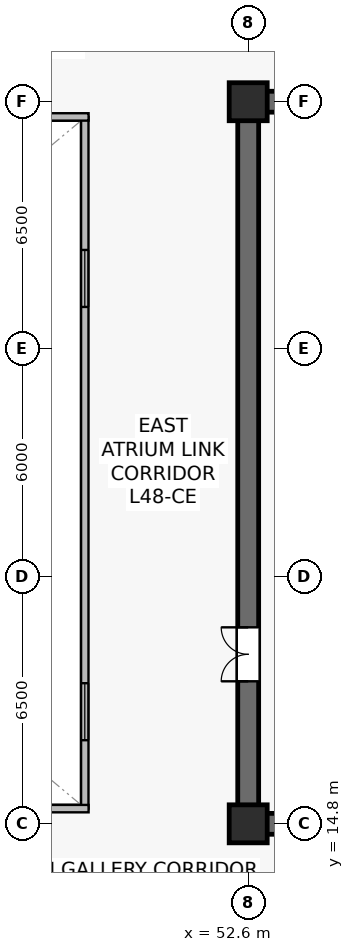
"""IFC4 building model, lengths in metres.
Left out: names, types, materials, properties, quantities, classifications, styles, units other than length and angle.
Written with IfcOpenShell. Run it as: python <this file> out.ifc"""

import sys

from ifc_helpers import new_model, si_unit, direction, frame, frame_2d, origin, origin_2d, place, context, subcontext, project, spatial, rectangle, extrude, source, transform, mapped, element, fill, save


model = new_model("IFC4")
c1 = context("Model", 3, precision=1e-05, world=origin(), true_north=direction((0.0, 1.0)))
c2 = subcontext(c1, "Body", "Model", "MODEL_VIEW")
j1 = project(units=[si_unit("LENGTHUNIT", "METRE"), si_unit("PLANEANGLEUNIT", "RADIAN")], contexts=[c1])
p1 = place(None, origin())
s1 = spatial("IfcSite", under=j1, at=p1, CompositionType="ELEMENT")
p2 = place(p1, origin())
s2 = spatial("IfcBuilding", under=s1, at=p2, CompositionType="ELEMENT")
p3 = place(p2, frame((0.0, 0.0, 201.4)))
s3 = spatial("IfcBuildingStorey", under=s2, at=p3, CompositionType="ELEMENT", Elevation=201.4)
p4 = place(p3, frame((52.325, 14.8, 0.0), z_axis=(0.0, 0.0, 1.0), x_axis=(1.0, 0.0, 0.0)))
e1 = element("IfcWall", 1, at=p4, inside=s3, PredefinedType="SHEAR", context=c2, shape_type="SweptSolid", body=[
    extrude(rectangle(XDim=15.35, YDim=0.55, at=frame_2d((7.675, 0.0))), origin(), (0.0, 0.0, 1.0), 3.8),
])
p5 = place(p3, frame((52.325, 33.8, 0.0), z_axis=(0.0, 0.0, 1.0), x_axis=(1.0, 0.0, 0.0)))
e2 = element("IfcWall", 2, at=p5, inside=s3, PredefinedType="SHEAR", context=c2, shape_type="SweptSolid", body=[
    extrude(rectangle(XDim=15.35, YDim=0.55, at=frame_2d((7.675, 0.0))), origin(), (0.0, 0.0, 1.0), 3.8),
])
p6 = place(p5, frame((7.625, 0.0, 0.0)))
e3 = element("IfcOpeningElement", 3, at=p6, cuts=e2, PredefinedType="OPENING", context=c2, shape_type="SweptSolid", body=[
    extrude(rectangle(XDim=0.95, YDim=2.15, at=frame_2d((0.475, 1.075))), frame((0.0, 0.285, 0.0), z_axis=(0.0, -1.0, 0.0), x_axis=(1.0, 0.0, 0.0)), (0.0, 0.0, 1.0), 0.57),
])
p7 = place(p5, frame((2.56, 0.0, 0.0)))
e4 = element("IfcOpeningElement", 4, at=p7, cuts=e2, PredefinedType="OPENING", context=c2, shape_type="SweptSolid", body=[
    extrude(rectangle(XDim=0.95, YDim=2.15, at=frame_2d((0.475, 1.075))), frame((0.0, 0.285, 0.0), z_axis=(0.0, -1.0, 0.0), x_axis=(1.0, 0.0, 0.0)), (0.0, 0.0, 1.0), 0.57),
])
p8 = place(p3, frame((52.6, 15.075, 0.0), z_axis=(0.0, 0.0, 1.0), x_axis=(0.0, 1.0, 0.0)))
e5 = element("IfcWall", 5, at=p8, inside=s3, PredefinedType="SHEAR", context=c2, shape_type="SweptSolid", body=[
    extrude(rectangle(XDim=18.45, YDim=0.55, at=frame_2d((9.225, 0.0))), origin(), (0.0, 0.0, 1.0), 3.8),
])
p9 = place(p8, frame((3.475, 0.0, 0.0)))
e6 = element("IfcOpeningElement", 6, at=p9, cuts=e5, PredefinedType="OPENING", context=c2, shape_type="SweptSolid", body=[
    extrude(rectangle(XDim=1.42, YDim=2.2, at=frame_2d((0.71, 1.1))), frame((0.0, 0.285, 0.0), z_axis=(0.0, -1.0, 0.0), x_axis=(1.0, 0.0, 0.0)), (0.0, 0.0, 1.0), 0.57),
])
m1 = source(origin(), c2, "Body", "SweptSolid", [
    extrude(rectangle(XDim=1.0, YDim=1.0, at=origin_2d()), origin(), (0.0, 0.0, 1.0), 4.1),
])
for number, where, z_axis, x_axis in (
    (7, (52.6, 14.8, 0.0), (0.0, 0.0, 1.0), (1.0, 0.0, 0.0)),
    (8, (52.6, 33.8, 0.0), (0.0, 0.0, 1.0), (1.0, 0.0, 0.0)),
):
    element("IfcColumn", number, at=place(p3, frame(where, z_axis=z_axis, x_axis=x_axis)), inside=s3, PredefinedType="COLUMN", context=c2, shape_type="MappedRepresentation", body=[
        mapped(m1, transform((0.0, 0.0, 0.0), scale=1.0)),
    ])
p10 = place(p3, frame((48.3, 15.2, 0.0), z_axis=(0.0, 0.0, 1.0), x_axis=(0.0, 1.0, 0.0)))
e9 = element("IfcWall", 9, at=p10, inside=s3, PredefinedType="SOLIDWALL", context=c2, shape_type="SweptSolid", body=[
    extrude(rectangle(XDim=18.2, YDim=0.195, at=frame_2d((9.1, 0.0))), origin(), (0.0, 0.0, 1.0), 3.8),
])
p11 = place(p10, frame((1.8, 0.0, 0.9)))
e10 = element("IfcOpeningElement", 10, at=p11, cuts=e9, PredefinedType="OPENING", context=c2, shape_type="SweptSolid", body=[
    extrude(rectangle(XDim=1.5, YDim=1.4, at=frame_2d((0.75, 0.7))), frame((0.0, 0.107, 0.0), z_axis=(0.0, -1.0, 0.0), x_axis=(1.0, 0.0, 0.0)), (0.0, 0.0, 1.0), 0.215),
])
p12 = place(p10, frame((13.2, 0.0, 0.9)))
e11 = element("IfcOpeningElement", 11, at=p12, cuts=e9, PredefinedType="OPENING", context=c2, shape_type="SweptSolid", body=[
    extrude(rectangle(XDim=1.5, YDim=1.4, at=frame_2d((0.75, 0.7))), frame((0.0, 0.107, 0.0), z_axis=(0.0, -1.0, 0.0), x_axis=(1.0, 0.0, 0.0)), (0.0, 0.0, 1.0), 0.215),
])
for number, where, z_axis, x_axis in (
    (12, (26.4, 15.2, 0.0), (0.0, 0.0, 1.0), (1.0, 0.0, 0.0)),
    (13, (26.4, 33.4, 0.0), (0.0, 0.0, 1.0), (1.0, 0.0, 0.0)),
):
    element("IfcWall", number, at=place(p3, frame(where, z_axis=z_axis, x_axis=x_axis)), inside=s3, PredefinedType="SOLIDWALL", context=c2, shape_type="SweptSolid", body=[
        extrude(rectangle(XDim=22.0, YDim=0.195, at=frame_2d((11.0, 0.0))), origin(), (0.0, 0.0, 1.0), 3.8),
    ])
m2 = source(origin(), c2, "Body", "SweptSolid", [
    extrude(rectangle(XDim=1.5, YDim=1.4, at=frame_2d((0.75, 0.7))), frame((0.0, 0.03, 0.0), z_axis=(0.0, -1.0, 0.0), x_axis=(1.0, 0.0, 0.0)), (0.0, 0.0, 1.0), 0.06),
])
p13 = place(p11, origin())
e14 = element("IfcWindow", 14, at=p13, inside=s3, PartitioningType="SINGLE_PANEL", PredefinedType="WINDOW", context=c2, shape_type="MappedRepresentation", body=[
    mapped(m2, transform((0.0, 0.0, 0.0), scale=1.0)),
])
fill(e10, e14)
p14 = place(p12, origin())
e15 = element("IfcWindow", 15, at=p14, inside=s3, PartitioningType="SINGLE_PANEL", PredefinedType="WINDOW", context=c2, shape_type="MappedRepresentation", body=[
    mapped(m2, transform((0.0, 0.0, 0.0), scale=1.0)),
])
fill(e11, e15)
m3 = source(origin(), c2, "Body", "SweptSolid", [
    extrude(rectangle(XDim=1.42, YDim=2.2, at=frame_2d((0.71, 1.1))), frame((0.0, 0.025, 0.0), z_axis=(0.0, -1.0, 0.0), x_axis=(1.0, 0.0, 0.0)), (0.0, 0.0, 1.0), 0.05),
])
p15 = place(p9, origin())
e16 = element("IfcDoor", 16, at=p15, inside=s3, OperationType="DOUBLE_DOOR_SINGLE_SWING", PredefinedType="DOOR", context=c2, shape_type="MappedRepresentation", body=[
    mapped(m3, transform((0.0, 0.0, 0.0), scale=1.0)),
])
fill(e6, e16)
save(model, sys.argv[1])
